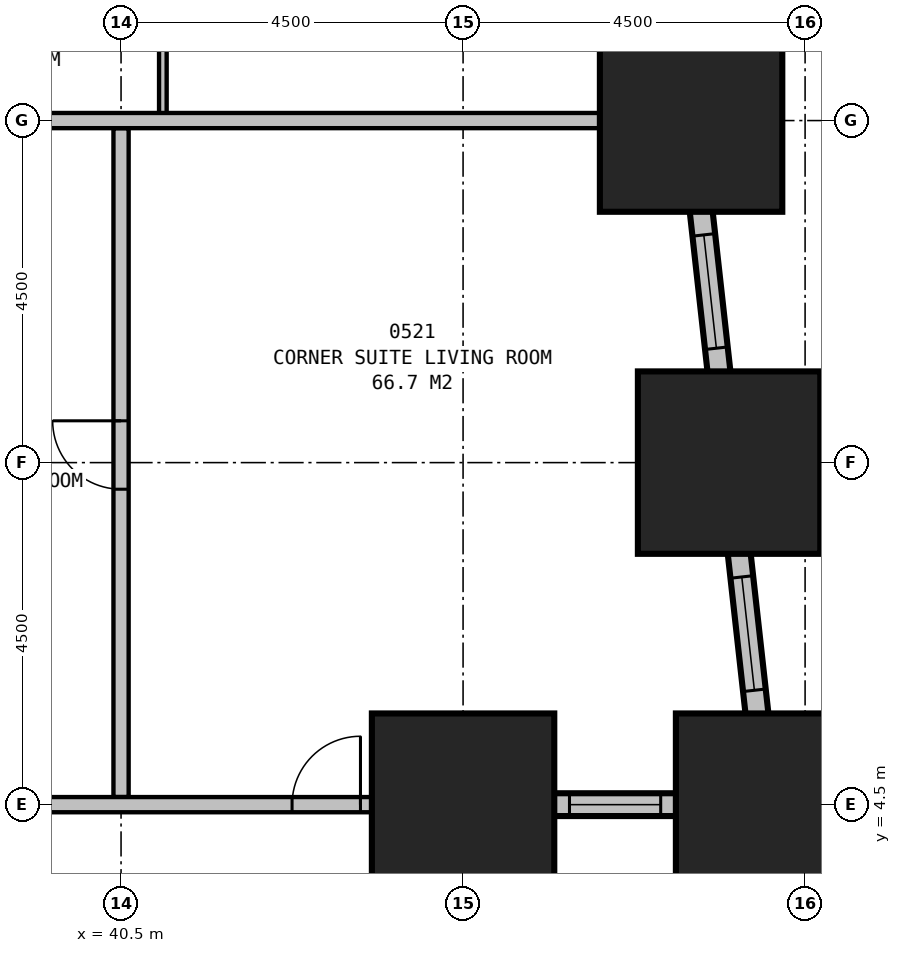
"""IFC4 building model, lengths in metres.
Left out: names, types, materials, properties, quantities, classifications, styles, units other than length and angle.
Written with IfcOpenShell. Run it as: python <this file> out.ifc"""

import sys

from ifc_helpers import new_model, si_unit, direction, frame, frame_2d, origin, origin_2d, place, context, subcontext, project, spatial, rectangle, extrude, element, fill, save


model = new_model("IFC4")
c1 = context("Model", 3, precision=1e-05, world=origin(), true_north=direction((0.0, 1.0)))
c2 = subcontext(c1, "Body", "Model", "MODEL_VIEW")
j1 = project(units=[si_unit("LENGTHUNIT", "METRE"), si_unit("PLANEANGLEUNIT", "RADIAN")], contexts=[c1])
p1 = place(None, origin())
s1 = spatial("IfcSite", under=j1, at=p1, CompositionType="ELEMENT")
p2 = place(p1, origin())
s2 = spatial("IfcBuilding", under=s1, at=p2, CompositionType="ELEMENT")
p3 = place(p2, frame((0.0, 0.0, 29.7)))
s3 = spatial("IfcBuildingStorey", under=s2, at=p3, CompositionType="ELEMENT", Elevation=29.7)
for number, where, z_axis, x_axis in (
    (1, (45.0, 4.5, 0.0), (0.0, 0.0, 1.0), (1.0, 0.0, 0.0)),
    (2, (49.0, 4.5, 0.0), (0.0, 0.0, 1.0), (1.0, 0.0, 0.0)),
    (3, (48.5, 9.0, 0.0), (0.0, 0.0, 1.0), (1.0, 0.0, 0.0)),
    (4, (48.0, 13.5, 0.0), (0.0, 0.0, 1.0), (1.0, 0.0, 0.0)),
):
    element("IfcColumn", number, at=place(p3, frame(where, z_axis=z_axis, x_axis=x_axis)), inside=s3, PredefinedType="COLUMN", context=c2, shape_type="SweptSolid", body=[
        extrude(rectangle(XDim=2.4, YDim=2.4, at=origin_2d()), origin(), (0.0, 0.0, 1.0), 3.5),
    ])
p4 = place(p3, frame((45.0, -0.15, 0.0), z_axis=(0.0, 0.0, 1.0), x_axis=(0.0, 1.0, 0.0)))
e5 = element("IfcWall", 5, at=p4, inside=s3, PredefinedType="STANDARD", context=c2, shape_type="SweptSolid", body=[
    extrude(rectangle(XDim=4.8, YDim=0.3, at=frame_2d((2.4, 0.0))), origin(), (0.0, 0.0, 1.0), 2.05),
])
p5 = place(p4, frame((1.65, 0.0, 0.5)))
e6 = element("IfcOpeningElement", 6, at=p5, cuts=e5, PredefinedType="OPENING", context=c2, shape_type="SweptSolid", body=[
    extrude(rectangle(XDim=1.5, YDim=1.4, at=frame_2d((0.75, 0.7))), frame((0.0, 0.16, 0.0), z_axis=(0.0, -1.0, 0.0), x_axis=(1.0, 0.0, 0.0)), (0.0, 0.0, 1.0), 0.32),
])
p6 = place(p3, frame((44.85, 4.5, 0.0), z_axis=(0.0, 0.0, 1.0), x_axis=(1.0, 0.0, 0.0)))
e7 = element("IfcWall", 7, at=p6, inside=s3, PredefinedType="STANDARD", context=c2, shape_type="SweptSolid", body=[
    extrude(rectangle(XDim=4.3, YDim=0.3, at=frame_2d((2.15, 0.0))), origin(), (0.0, 0.0, 1.0), 2.05),
])
p7 = place(p6, frame((1.55, 0.0, 0.5)))
e8 = element("IfcOpeningElement", 8, at=p7, cuts=e7, PredefinedType="OPENING", context=c2, shape_type="SweptSolid", body=[
    extrude(rectangle(XDim=1.2, YDim=1.4, at=frame_2d((0.6, 0.7))), frame((0.0, 0.16, 0.0), z_axis=(0.0, -1.0, 0.0), x_axis=(1.0, 0.0, 0.0)), (0.0, 0.0, 1.0), 0.32),
])
p8 = place(p3, frame((49.017, 4.351, 0.0), z_axis=(0.0, 0.0, 1.0), x_axis=(-0.110433201132, 0.993883548555, 0.0)))
e9 = element("IfcWall", 9, at=p8, inside=s3, PredefinedType="STANDARD", context=c2, shape_type="SweptSolid", body=[
    extrude(rectangle(XDim=31.994, YDim=0.3, at=frame_2d((15.997, 0.0))), origin(), (0.0, 0.0, 1.0), 2.05),
])
p9 = place(p8, frame((1.664, 0.0, 0.5)))
e10 = element("IfcOpeningElement", 10, at=p9, cuts=e9, PredefinedType="OPENING", context=c2, shape_type="SweptSolid", body=[
    extrude(rectangle(XDim=1.5, YDim=1.4, at=frame_2d((0.75, 0.7))), frame((0.0, 0.16, 0.0), z_axis=(0.0, -1.0, 0.0), x_axis=(1.0, 0.0, 0.0)), (0.0, 0.0, 1.0), 0.32),
])
p10 = place(p8, frame((6.192, 0.0, 0.5)))
e11 = element("IfcOpeningElement", 11, at=p10, cuts=e9, PredefinedType="OPENING", context=c2, shape_type="SweptSolid", body=[
    extrude(rectangle(XDim=1.5, YDim=1.4, at=frame_2d((0.75, 0.7))), frame((0.0, 0.16, 0.0), z_axis=(0.0, -1.0, 0.0), x_axis=(1.0, 0.0, 0.0)), (0.0, 0.0, 1.0), 0.32),
])
p11 = place(p8, frame((10.719, 0.0, 0.5)))
e12 = element("IfcOpeningElement", 12, at=p11, cuts=e9, PredefinedType="OPENING", context=c2, shape_type="SweptSolid", body=[
    extrude(rectangle(XDim=1.5, YDim=1.4, at=frame_2d((0.75, 0.7))), frame((0.0, 0.16, 0.0), z_axis=(0.0, -1.0, 0.0), x_axis=(1.0, 0.0, 0.0)), (0.0, 0.0, 1.0), 0.32),
])
p12 = place(p8, frame((15.247, 0.0, 0.5)))
e13 = element("IfcOpeningElement", 13, at=p12, cuts=e9, PredefinedType="OPENING", context=c2, shape_type="SweptSolid", body=[
    extrude(rectangle(XDim=1.5, YDim=1.4, at=frame_2d((0.75, 0.7))), frame((0.0, 0.16, 0.0), z_axis=(0.0, -1.0, 0.0), x_axis=(1.0, 0.0, 0.0)), (0.0, 0.0, 1.0), 0.32),
])
p13 = place(p8, frame((19.775, 0.0, 0.5)))
e14 = element("IfcOpeningElement", 14, at=p13, cuts=e9, PredefinedType="OPENING", context=c2, shape_type="SweptSolid", body=[
    extrude(rectangle(XDim=1.5, YDim=1.4, at=frame_2d((0.75, 0.7))), frame((0.0, 0.16, 0.0), z_axis=(0.0, -1.0, 0.0), x_axis=(1.0, 0.0, 0.0)), (0.0, 0.0, 1.0), 0.32),
])
p14 = place(p8, frame((24.302, 0.0, 0.5)))
e15 = element("IfcOpeningElement", 15, at=p14, cuts=e9, PredefinedType="OPENING", context=c2, shape_type="SweptSolid", body=[
    extrude(rectangle(XDim=1.5, YDim=1.4, at=frame_2d((0.75, 0.7))), frame((0.0, 0.16, 0.0), z_axis=(0.0, -1.0, 0.0), x_axis=(1.0, 0.0, 0.0)), (0.0, 0.0, 1.0), 0.32),
])
p15 = place(p8, frame((28.83, 0.0, 0.5)))
e16 = element("IfcOpeningElement", 16, at=p15, cuts=e9, PredefinedType="OPENING", context=c2, shape_type="SweptSolid", body=[
    extrude(rectangle(XDim=1.5, YDim=1.4, at=frame_2d((0.75, 0.7))), frame((0.0, 0.16, 0.0), z_axis=(0.0, -1.0, 0.0), x_axis=(1.0, 0.0, 0.0)), (0.0, 0.0, 1.0), 0.32),
])
p16 = place(p3, frame((41.05, 13.5, 0.0), z_axis=(0.0, 0.0, 1.0), x_axis=(0.0, 1.0, 0.0)))
e17 = element("IfcWall", 17, at=p16, inside=s3, PredefinedType="PLUMBINGWALL", context=c2, shape_type="SweptSolid", body=[
    extrude(rectangle(XDim=2.4, YDim=0.1, at=frame_2d((1.2, 0.0))), origin(), (0.0, 0.0, 1.0), 3.25),
])
p17 = place(p3, frame((38.3, 13.5, 0.0), z_axis=(0.0, 0.0, 1.0), x_axis=(1.0, 0.0, 0.0)))
e18 = element("IfcWall", 18, at=p17, inside=s3, PredefinedType="PARTITIONING", context=c2, shape_type="SweptSolid", body=[
    extrude(rectangle(XDim=9.921, YDim=0.2, at=frame_2d((4.96, 0.0))), origin(), (0.0, 0.0, 1.0), 1.95),
])
p18 = place(p3, frame((35.9, 4.5, 0.0), z_axis=(0.0, 0.0, 1.0), x_axis=(1.0, 0.0, 0.0)))
e19 = element("IfcWall", 19, at=p18, inside=s3, PredefinedType="PARTITIONING", context=c2, shape_type="SweptSolid", body=[
    extrude(rectangle(XDim=9.1, YDim=0.2, at=frame_2d((4.55, 0.0))), origin(), (0.0, 0.0, 1.0), 3.25),
])
p19 = place(p18, frame((6.85, 0.0, 0.0)))
e20 = element("IfcOpeningElement", 20, at=p19, cuts=e19, PredefinedType="OPENING", context=c2, shape_type="SweptSolid", body=[
    extrude(rectangle(XDim=0.9, YDim=2.1, at=frame_2d((0.45, 1.05))), frame((0.0, 0.11, 0.0), z_axis=(0.0, -1.0, 0.0), x_axis=(1.0, 0.0, 0.0)), (0.0, 0.0, 1.0), 0.22),
])
p20 = place(p3, frame((40.5, 4.6, 0.0), z_axis=(0.0, 0.0, 1.0), x_axis=(0.0, 1.0, 0.0)))
e21 = element("IfcWall", 21, at=p20, inside=s3, PredefinedType="PARTITIONING", context=c2, shape_type="SweptSolid", body=[
    extrude(rectangle(XDim=8.8, YDim=0.2, at=frame_2d((4.4, 0.0))), origin(), (0.0, 0.0, 1.0), 2.25),
])
p21 = place(p20, frame((4.05, 0.0, 0.0)))
e22 = element("IfcOpeningElement", 22, at=p21, cuts=e21, PredefinedType="OPENING", context=c2, shape_type="SweptSolid", body=[
    extrude(rectangle(XDim=0.9, YDim=2.1, at=frame_2d((0.45, 1.05))), frame((0.0, 0.11, 0.0), z_axis=(0.0, -1.0, 0.0), x_axis=(1.0, 0.0, 0.0)), (0.0, 0.0, 1.0), 0.22),
])
p22 = place(p7, origin())
e23 = element("IfcWindow", 23, at=p22, inside=s3, PartitioningType="SINGLE_PANEL", PredefinedType="WINDOW", context=c2, shape_type="SweptSolid", body=[
    extrude(rectangle(XDim=1.2, YDim=1.4, at=frame_2d((0.6, 0.7))), frame((0.0, 0.03, 0.0), z_axis=(0.0, -1.0, 0.0), x_axis=(1.0, 0.0, 0.0)), (0.0, 0.0, 1.0), 0.06),
])
fill(e8, e23)
p23 = place(p9, origin())
e24 = element("IfcWindow", 24, at=p23, inside=s3, PartitioningType="SINGLE_PANEL", PredefinedType="WINDOW", context=c2, shape_type="SweptSolid", body=[
    extrude(rectangle(XDim=1.5, YDim=1.4, at=frame_2d((0.75, 0.7))), frame((0.0, 0.03, 0.0), z_axis=(0.0, -1.0, 0.0), x_axis=(1.0, 0.0, 0.0)), (0.0, 0.0, 1.0), 0.06),
])
fill(e10, e24)
p24 = place(p10, origin())
e25 = element("IfcWindow", 25, at=p24, inside=s3, PartitioningType="SINGLE_PANEL", PredefinedType="WINDOW", context=c2, shape_type="SweptSolid", body=[
    extrude(rectangle(XDim=1.5, YDim=1.4, at=frame_2d((0.75, 0.7))), frame((0.0, 0.03, 0.0), z_axis=(0.0, -1.0, 0.0), x_axis=(1.0, 0.0, 0.0)), (0.0, 0.0, 1.0), 0.06),
])
fill(e11, e25)
p25 = place(p19, origin())
e26 = element("IfcDoor", 26, at=p25, inside=s3, OperationType="SINGLE_SWING_RIGHT", PredefinedType="DOOR", context=c2, shape_type="SweptSolid", body=[
    extrude(rectangle(XDim=0.9, YDim=2.1, at=frame_2d((0.45, 1.05))), frame((0.0, 0.025, 0.0), z_axis=(0.0, -1.0, 0.0), x_axis=(1.0, 0.0, 0.0)), (0.0, 0.0, 1.0), 0.05),
])
fill(e20, e26)
p26 = place(p21, origin())
e27 = element("IfcDoor", 27, at=p26, inside=s3, OperationType="SINGLE_SWING_RIGHT", PredefinedType="DOOR", context=c2, shape_type="SweptSolid", body=[
    extrude(rectangle(XDim=0.9, YDim=2.1, at=frame_2d((0.45, 1.05))), frame((0.0, 0.025, 0.0), z_axis=(0.0, -1.0, 0.0), x_axis=(1.0, 0.0, 0.0)), (0.0, 0.0, 1.0), 0.05),
])
fill(e22, e27)
save(model, sys.argv[1])
